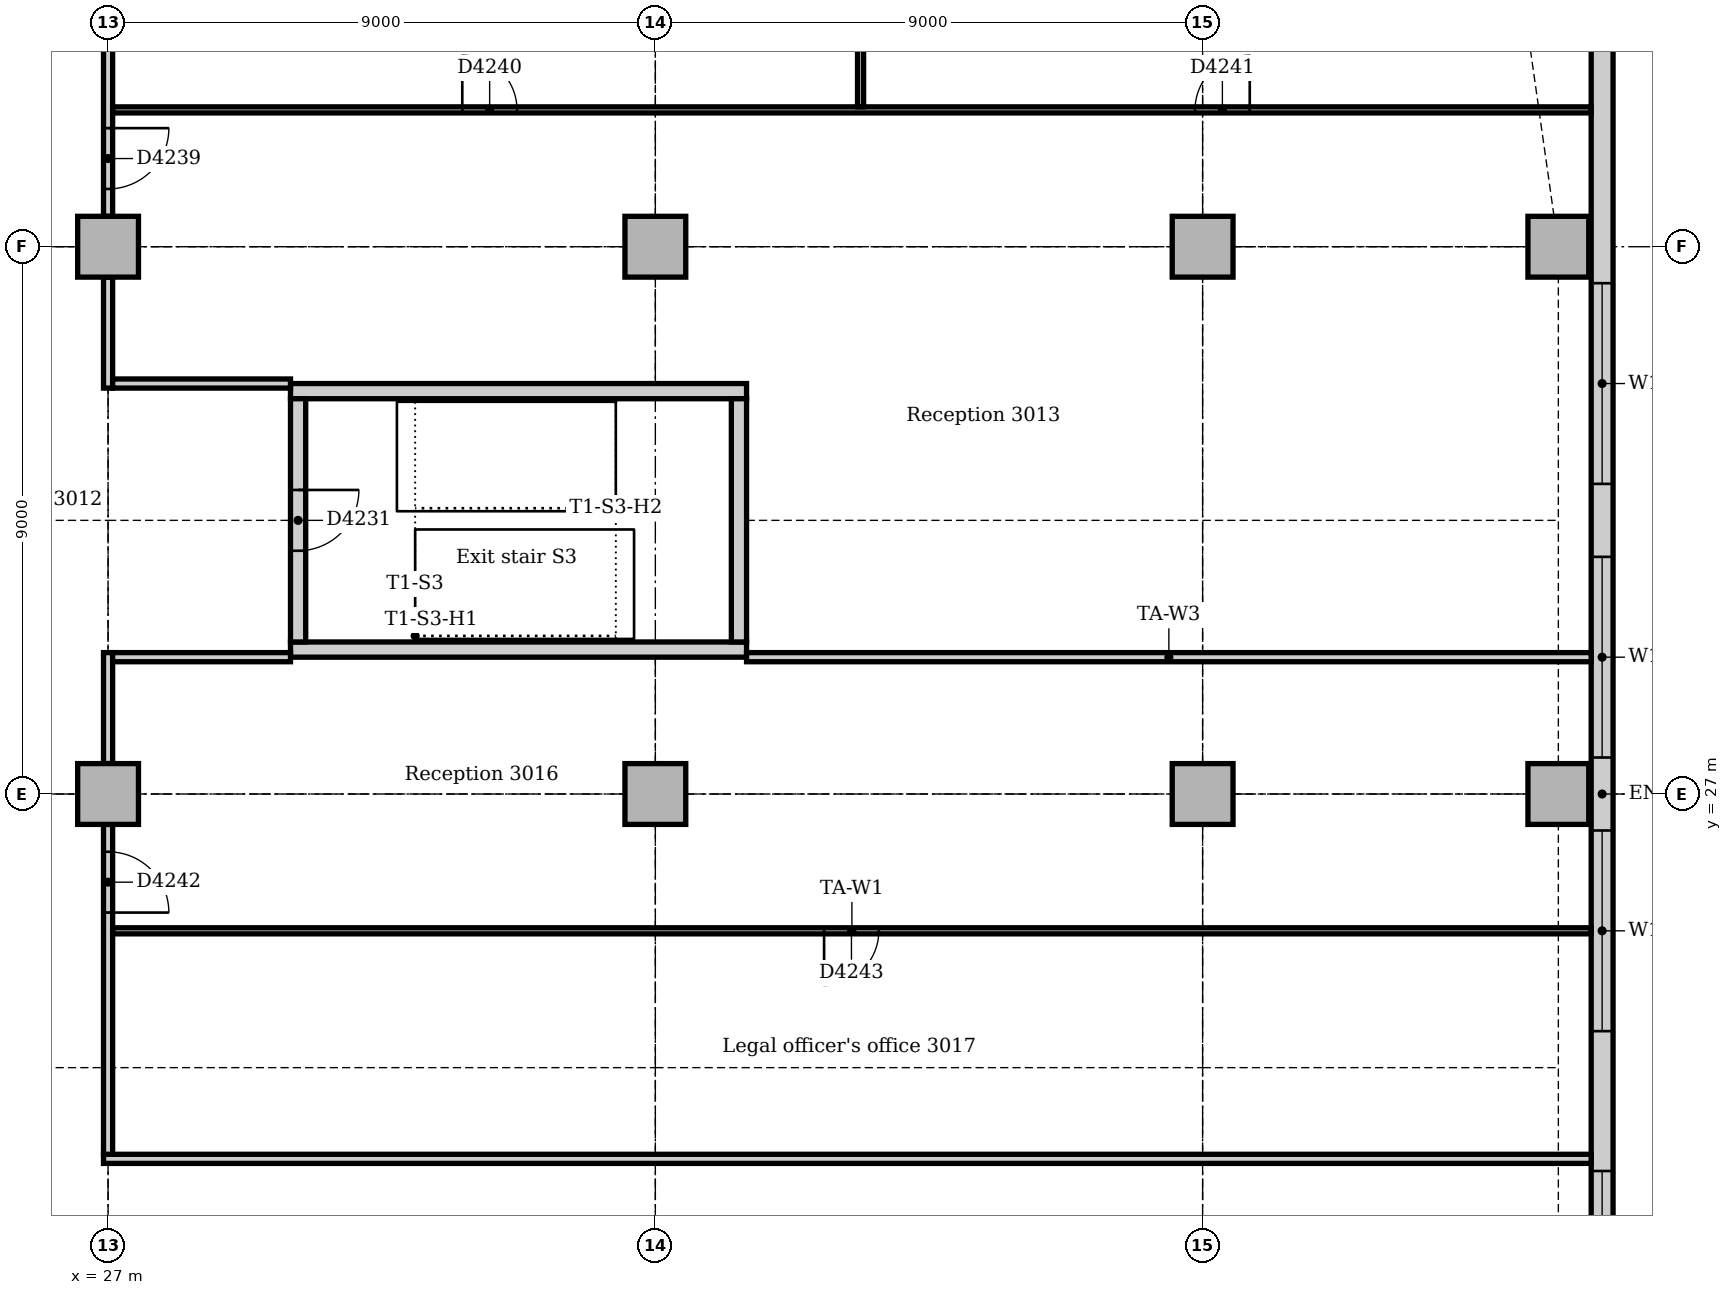
"""IFC4 building model, lengths in metres.
Left out: names, types, materials, properties, quantities, classifications, styles, units other than length and angle.
Written with IfcOpenShell. Run it as: python <this file> out.ifc"""

import sys

from ifc_helpers import new_model, si_unit, direction, frame, frame_2d, origin, origin_2d, place, context, subcontext, project, spatial, rectangle, extrude, element, fill, save


model = new_model("IFC4")
c1 = context("Model", 3, precision=1e-05, world=origin(), true_north=direction((0.0, 1.0)))
c2 = subcontext(c1, "Body", "Model", "MODEL_VIEW")
j1 = project(units=[si_unit("LENGTHUNIT", "METRE"), si_unit("PLANEANGLEUNIT", "RADIAN")], contexts=[c1])
p1 = place(None, origin())
s1 = spatial("IfcSite", under=j1, at=p1, CompositionType="ELEMENT")
p2 = place(p1, origin())
s2 = spatial("IfcBuilding", under=s1, at=p2, CompositionType="ELEMENT")
p3 = place(p2, frame((0.0, 0.0, 128.0)))
s3 = spatial("IfcBuildingStorey", under=s2, at=p3, CompositionType="ELEMENT", Elevation=128.0)
for number, where, z_axis, x_axis in (
    (1, (30.0, 29.375, 0.0), (0.0, 0.0, 1.0), (1.0, 0.0, 0.0)),
    (2, (37.5, 33.625, 0.0), (0.0, 0.0, 1.0), (-1.0, 0.0, 0.0)),
):
    element("IfcWall", number, at=place(p3, frame(where, z_axis=z_axis, x_axis=x_axis)), inside=s3, PredefinedType="SOLIDWALL", context=c2, shape_type="SweptSolid", body=[
        extrude(rectangle(XDim=7.5, YDim=0.25, at=frame_2d((3.75, 0.0))), origin(), (0.0, 0.0, 1.0), 4.0),
    ])
p4 = place(p3, frame((37.375, 29.5, 0.0), z_axis=(0.0, 0.0, 1.0), x_axis=(0.0, 1.0, 0.0)))
e3 = element("IfcWall", 3, at=p4, inside=s3, PredefinedType="SOLIDWALL", context=c2, shape_type="SweptSolid", body=[
    extrude(rectangle(XDim=4.0, YDim=0.25, at=frame_2d((2.0, 0.0))), origin(), (0.0, 0.0, 1.0), 4.0),
])
p5 = place(p3, frame((30.125, 33.5, 0.0), z_axis=(0.0, 0.0, 1.0), x_axis=(0.0, -1.0, 0.0)))
e4 = element("IfcWall", 4, at=p5, inside=s3, PredefinedType="SOLIDWALL", context=c2, shape_type="SweptSolid", body=[
    extrude(rectangle(XDim=4.0, YDim=0.25, at=frame_2d((2.0, 0.0))), origin(), (0.0, 0.0, 1.0), 4.0),
])
p6 = place(p5, frame((1.5, 0.0, 0.0)))
e5 = element("IfcOpeningElement", 5, at=p6, cuts=e4, PredefinedType="OPENING", context=c2, shape_type="SweptSolid", body=[
    extrude(rectangle(XDim=1.0, YDim=2.1, at=frame_2d((0.5, 1.05))), frame((0.0, 0.135, 0.0), z_axis=(0.0, -1.0, 0.0), x_axis=(1.0, 0.0, 0.0)), (0.0, 0.0, 1.0), 0.27),
])
for number, where, z_axis, x_axis in (
    (6, (50.85, 27.0, 0.0), (0.0, 0.0, 1.0), (1.0, 0.0, 0.0)),
    (7, (50.85, 36.0, 0.0), (0.0, 0.0, 1.0), (1.0, 0.0, 0.0)),
    (8, (27.0, 27.0, 0.0), (0.0, 0.0, 1.0), (1.0, 0.0, 0.0)),
    (9, (27.0, 36.0, 0.0), (0.0, 0.0, 1.0), (1.0, 0.0, 0.0)),
    (10, (36.0, 27.0, 0.0), (0.0, 0.0, 1.0), (1.0, 0.0, 0.0)),
    (11, (36.0, 36.0, 0.0), (0.0, 0.0, 1.0), (1.0, 0.0, 0.0)),
    (12, (45.0, 27.0, 0.0), (0.0, 0.0, 1.0), (1.0, 0.0, 0.0)),
    (13, (45.0, 36.0, 0.0), (0.0, 0.0, 1.0), (1.0, 0.0, 0.0)),
):
    element("IfcColumn", number, at=place(p3, frame(where, z_axis=z_axis, x_axis=x_axis)), inside=s3, PredefinedType="COLUMN", context=c2, shape_type="SweptSolid", body=[
        extrude(rectangle(XDim=1.0, YDim=1.0, at=origin_2d()), origin(), (0.0, 0.0, 1.0), 3.85),
    ])
p7 = place(p3, frame((51.57, 14.743, 0.0), z_axis=(0.0, 0.0, 1.0), x_axis=(0.0, 1.0, 0.0)))
e14 = element("IfcWall", 14, at=p7, inside=s3, PredefinedType="STANDARD", context=c2, shape_type="SweptSolid", body=[
    extrude(rectangle(XDim=24.515, YDim=0.36, at=frame_2d((12.257, 0.0))), origin(), (0.0, 0.0, 1.0), 3.85),
])
p8 = place(p7, frame((4.257, 0.0, 0.9)))
e15 = element("IfcOpeningElement", 15, at=p8, cuts=e14, PredefinedType="OPENING", context=c2, shape_type="SweptSolid", body=[
    extrude(rectangle(XDim=1.8, YDim=1.6, at=frame_2d((0.9, 0.8))), frame((0.0, 0.19, 0.0), z_axis=(0.0, -1.0, 0.0), x_axis=(1.0, 0.0, 0.0)), (0.0, 0.0, 1.0), 0.38),
])
p9 = place(p7, frame((8.357, 0.0, 0.9)))
e16 = element("IfcOpeningElement", 16, at=p9, cuts=e14, PredefinedType="OPENING", context=c2, shape_type="SweptSolid", body=[
    extrude(rectangle(XDim=3.3, YDim=1.6, at=frame_2d((1.65, 0.8))), frame((0.0, 0.19, 0.0), z_axis=(0.0, -1.0, 0.0), x_axis=(1.0, 0.0, 0.0)), (0.0, 0.0, 1.0), 0.38),
])
p10 = place(p7, frame((12.857, 0.0, 0.9)))
e17 = element("IfcOpeningElement", 17, at=p10, cuts=e14, PredefinedType="OPENING", context=c2, shape_type="SweptSolid", body=[
    extrude(rectangle(XDim=3.3, YDim=1.6, at=frame_2d((1.65, 0.8))), frame((0.0, 0.19, 0.0), z_axis=(0.0, -1.0, 0.0), x_axis=(1.0, 0.0, 0.0)), (0.0, 0.0, 1.0), 0.38),
])
p11 = place(p7, frame((17.357, 0.0, 0.9)))
e18 = element("IfcOpeningElement", 18, at=p11, cuts=e14, PredefinedType="OPENING", context=c2, shape_type="SweptSolid", body=[
    extrude(rectangle(XDim=3.3, YDim=1.6, at=frame_2d((1.65, 0.8))), frame((0.0, 0.19, 0.0), z_axis=(0.0, -1.0, 0.0), x_axis=(1.0, 0.0, 0.0)), (0.0, 0.0, 1.0), 0.38),
])
p12 = place(p3, frame((26.925, 21.0, 0.0), z_axis=(0.0, 0.0, 1.0), x_axis=(1.0, 0.0, 0.0)))
e19 = element("IfcWall", 19, at=p12, inside=s3, PredefinedType="PARTITIONING", context=c2, shape_type="SweptSolid", body=[
    extrude(rectangle(XDim=24.465, YDim=0.15, at=frame_2d((12.232, 0.0))), origin(), (0.0, 0.0, 1.0), 3.85),
])
p13 = place(p3, frame((27.0, 33.675, 0.0), z_axis=(0.0, 0.0, 1.0), x_axis=(0.0, 1.0, 0.0)))
e20 = element("IfcWall", 20, at=p13, inside=s3, PredefinedType="PARTITIONING", context=c2, shape_type="SweptSolid", body=[
    extrude(rectangle(XDim=1.825, YDim=0.15, at=frame_2d((0.912, 0.0))), origin(), (0.0, 0.0, 1.0), 3.256),
])
p14 = place(p3, frame((27.0, 36.5, 0.0), z_axis=(0.0, 0.0, 1.0), x_axis=(0.0, 1.0, 0.0)))
e21 = element("IfcWall", 21, at=p14, inside=s3, PredefinedType="PARTITIONING", context=c2, shape_type="SweptSolid", body=[
    extrude(rectangle(XDim=7.1, YDim=0.15, at=frame_2d((3.55, 0.0))), origin(), (0.0, 0.0, 1.0), 3.256),
])
p15 = place(p14, frame((0.45, 0.0, 0.0)))
e22 = element("IfcOpeningElement", 22, at=p15, cuts=e21, PredefinedType="OPENING", context=c2, shape_type="SweptSolid", body=[
    extrude(rectangle(XDim=1.0, YDim=2.1, at=frame_2d((0.5, 1.05))), frame((0.0, 0.085, 0.0), z_axis=(0.0, -1.0, 0.0), x_axis=(1.0, 0.0, 0.0)), (0.0, 0.0, 1.0), 0.17),
])
p16 = place(p3, frame((27.0, 21.075, 0.0), z_axis=(0.0, 0.0, 1.0), x_axis=(0.0, 1.0, 0.0)))
e23 = element("IfcWall", 23, at=p16, inside=s3, PredefinedType="PARTITIONING", context=c2, shape_type="SweptSolid", body=[
    extrude(rectangle(XDim=5.425, YDim=0.15, at=frame_2d((2.712, 0.0))), origin(), (0.0, 0.0, 1.0), 3.256),
])
p17 = place(p16, frame((3.975, 0.0, 0.0)))
e24 = element("IfcOpeningElement", 24, at=p17, cuts=e23, PredefinedType="OPENING", context=c2, shape_type="SweptSolid", body=[
    extrude(rectangle(XDim=1.0, YDim=2.1, at=frame_2d((0.5, 1.05))), frame((0.0, 0.085, 0.0), z_axis=(0.0, -1.0, 0.0), x_axis=(1.0, 0.0, 0.0)), (0.0, 0.0, 1.0), 0.17),
])
p18 = place(p3, frame((27.0, 27.5, 0.0), z_axis=(0.0, 0.0, 1.0), x_axis=(0.0, 1.0, 0.0)))
e25 = element("IfcWall", 25, at=p18, inside=s3, PredefinedType="PARTITIONING", context=c2, shape_type="SweptSolid", body=[
    extrude(rectangle(XDim=1.825, YDim=0.15, at=frame_2d((0.912, 0.0))), origin(), (0.0, 0.0, 1.0), 3.256),
])
for number, where, z_axis, x_axis in (
    (26, (27.075, 29.25, 0.0), (0.0, 0.0, 1.0), (1.0, 0.0, 0.0)),
    (27, (27.075, 33.75, 0.0), (0.0, 0.0, 1.0), (1.0, 0.0, 0.0)),
):
    element("IfcWall", number, at=place(p3, frame(where, z_axis=z_axis, x_axis=x_axis)), inside=s3, PredefinedType="PARTITIONING", context=c2, shape_type="SweptSolid", body=[
        extrude(rectangle(XDim=2.925, YDim=0.15, at=frame_2d((1.462, 0.0))), origin(), (0.0, 0.0, 1.0), 3.85),
    ])
p19 = place(p3, frame((37.5, 29.25, 0.0), z_axis=(0.0, 0.0, 1.0), x_axis=(1.0, 0.0, 0.0)))
e28 = element("IfcWall", 28, at=p19, inside=s3, PredefinedType="PARTITIONING", context=c2, shape_type="SweptSolid", body=[
    extrude(rectangle(XDim=13.89, YDim=0.15, at=frame_2d((6.945, 0.0))), origin(), (0.0, 0.0, 1.0), 3.85),
])
p20 = place(p3, frame((27.075, 24.75, 0.0), z_axis=(0.0, 0.0, 1.0), x_axis=(1.0, 0.0, 0.0)))
e29 = element("IfcWall", 29, at=p20, inside=s3, PredefinedType="PARTITIONING", context=c2, shape_type="SweptSolid", body=[
    extrude(rectangle(XDim=24.315, YDim=0.1, at=frame_2d((12.158, 0.0))), origin(), (0.0, 0.0, 1.0), 3.85),
])
p21 = place(p20, frame((11.7, 0.0, 0.0)))
e30 = element("IfcOpeningElement", 30, at=p21, cuts=e29, PredefinedType="OPENING", context=c2, shape_type="SweptSolid", body=[
    extrude(rectangle(XDim=0.9, YDim=2.1, at=frame_2d((0.45, 1.05))), frame((0.0, 0.06, 0.0), z_axis=(0.0, -1.0, 0.0), x_axis=(1.0, 0.0, 0.0)), (0.0, 0.0, 1.0), 0.12),
])
p22 = place(p3, frame((27.075, 38.25, 0.0), z_axis=(0.0, 0.0, 1.0), x_axis=(1.0, 0.0, 0.0)))
e31 = element("IfcWall", 31, at=p22, inside=s3, PredefinedType="PARTITIONING", context=c2, shape_type="SweptSolid", body=[
    extrude(rectangle(XDim=24.315, YDim=0.1, at=frame_2d((12.158, 0.0))), origin(), (0.0, 0.0, 1.0), 3.85),
])
p23 = place(p22, frame((5.75, 0.0, 0.0)))
e32 = element("IfcOpeningElement", 32, at=p23, cuts=e31, PredefinedType="OPENING", context=c2, shape_type="SweptSolid", body=[
    extrude(rectangle(XDim=0.9, YDim=2.1, at=frame_2d((0.45, 1.05))), frame((0.0, 0.06, 0.0), z_axis=(0.0, -1.0, 0.0), x_axis=(1.0, 0.0, 0.0)), (0.0, 0.0, 1.0), 0.12),
])
p24 = place(p22, frame((17.8, 0.0, 0.0)))
e33 = element("IfcOpeningElement", 33, at=p24, cuts=e31, PredefinedType="OPENING", context=c2, shape_type="SweptSolid", body=[
    extrude(rectangle(XDim=0.9, YDim=2.1, at=frame_2d((0.45, 1.05))), frame((0.0, 0.06, 0.0), z_axis=(0.0, -1.0, 0.0), x_axis=(1.0, 0.0, 0.0)), (0.0, 0.0, 1.0), 0.12),
])
p25 = place(p3, frame((39.375, 38.3, 0.0), z_axis=(0.0, 0.0, 1.0), x_axis=(0.0, 1.0, 0.0)))
e34 = element("IfcWall", 34, at=p25, inside=s3, PredefinedType="PARTITIONING", context=c2, shape_type="SweptSolid", body=[
    extrude(rectangle(XDim=10.84, YDim=0.1, at=frame_2d((5.42, 0.0))), origin(), (0.0, 0.0, 1.0), 3.85),
])
p26 = place(p8, origin())
e35 = element("IfcWindow", 35, at=p26, inside=s3, PartitioningType="SINGLE_PANEL", PredefinedType="WINDOW", context=c2, shape_type="SweptSolid", body=[
    extrude(rectangle(XDim=1.8, YDim=1.6, at=frame_2d((0.9, 0.8))), frame((0.0, 0.13, 0.0), z_axis=(0.0, -1.0, 0.0), x_axis=(1.0, 0.0, 0.0)), (0.0, 0.0, 1.0), 0.06),
])
fill(e15, e35)
p27 = place(p9, origin())
e36 = element("IfcWindow", 36, at=p27, inside=s3, PartitioningType="SINGLE_PANEL", PredefinedType="WINDOW", context=c2, shape_type="SweptSolid", body=[
    extrude(rectangle(XDim=3.3, YDim=1.6, at=frame_2d((1.65, 0.8))), frame((0.0, 0.13, 0.0), z_axis=(0.0, -1.0, 0.0), x_axis=(1.0, 0.0, 0.0)), (0.0, 0.0, 1.0), 0.06),
])
fill(e16, e36)
p28 = place(p10, origin())
e37 = element("IfcWindow", 37, at=p28, inside=s3, PartitioningType="SINGLE_PANEL", PredefinedType="WINDOW", context=c2, shape_type="SweptSolid", body=[
    extrude(rectangle(XDim=3.3, YDim=1.6, at=frame_2d((1.65, 0.8))), frame((0.0, 0.13, 0.0), z_axis=(0.0, -1.0, 0.0), x_axis=(1.0, 0.0, 0.0)), (0.0, 0.0, 1.0), 0.06),
])
fill(e17, e37)
p29 = place(p11, origin())
e38 = element("IfcWindow", 38, at=p29, inside=s3, PartitioningType="SINGLE_PANEL", PredefinedType="WINDOW", context=c2, shape_type="SweptSolid", body=[
    extrude(rectangle(XDim=3.3, YDim=1.6, at=frame_2d((1.65, 0.8))), frame((0.0, 0.13, 0.0), z_axis=(0.0, -1.0, 0.0), x_axis=(1.0, 0.0, 0.0)), (0.0, 0.0, 1.0), 0.06),
])
fill(e18, e38)
p30 = place(p6, origin())
e39 = element("IfcDoor", 39, at=p30, inside=s3, OperationType="SINGLE_SWING_LEFT", PredefinedType="DOOR", context=c2, shape_type="SweptSolid", body=[
    extrude(rectangle(XDim=1.0, YDim=2.1, at=frame_2d((0.5, 1.05))), frame((0.0, 0.025, 0.0), z_axis=(0.0, -1.0, 0.0), x_axis=(1.0, 0.0, 0.0)), (0.0, 0.0, 1.0), 0.05),
])
fill(e5, e39)
p31 = place(p15, frame((1.0, 0.0, 0.0), z_axis=(0.0, 0.0, 1.0), x_axis=(-1.0, 0.0, 0.0)))
e40 = element("IfcDoor", 40, at=p31, inside=s3, OperationType="SINGLE_SWING_LEFT", PredefinedType="DOOR", context=c2, shape_type="SweptSolid", body=[
    extrude(rectangle(XDim=1.0, YDim=2.1, at=frame_2d((0.5, 1.05))), frame((0.0, 0.025, 0.0), z_axis=(0.0, -1.0, 0.0), x_axis=(1.0, 0.0, 0.0)), (0.0, 0.0, 1.0), 0.05),
])
fill(e22, e40)
p32 = place(p23, origin())
e41 = element("IfcDoor", 41, at=p32, inside=s3, OperationType="SINGLE_SWING_LEFT", PredefinedType="DOOR", context=c2, shape_type="SweptSolid", body=[
    extrude(rectangle(XDim=0.9, YDim=2.1, at=frame_2d((0.45, 1.05))), frame((0.0, 0.025, 0.0), z_axis=(0.0, -1.0, 0.0), x_axis=(1.0, 0.0, 0.0)), (0.0, 0.0, 1.0), 0.05),
])
fill(e32, e41)
p33 = place(p24, origin())
e42 = element("IfcDoor", 42, at=p33, inside=s3, OperationType="SINGLE_SWING_RIGHT", PredefinedType="DOOR", context=c2, shape_type="SweptSolid", body=[
    extrude(rectangle(XDim=0.9, YDim=2.1, at=frame_2d((0.45, 1.05))), frame((0.0, 0.025, 0.0), z_axis=(0.0, -1.0, 0.0), x_axis=(1.0, 0.0, 0.0)), (0.0, 0.0, 1.0), 0.05),
])
fill(e33, e42)
p34 = place(p17, frame((1.0, 0.0, 0.0), z_axis=(0.0, 0.0, 1.0), x_axis=(-1.0, 0.0, 0.0)))
e43 = element("IfcDoor", 43, at=p34, inside=s3, OperationType="SINGLE_SWING_RIGHT", PredefinedType="DOOR", context=c2, shape_type="SweptSolid", body=[
    extrude(rectangle(XDim=1.0, YDim=2.1, at=frame_2d((0.5, 1.05))), frame((0.0, 0.025, 0.0), z_axis=(0.0, -1.0, 0.0), x_axis=(1.0, 0.0, 0.0)), (0.0, 0.0, 1.0), 0.05),
])
fill(e24, e43)
p35 = place(p21, frame((0.9, 0.0, 0.0), z_axis=(0.0, 0.0, 1.0), x_axis=(-1.0, 0.0, 0.0)))
e44 = element("IfcDoor", 44, at=p35, inside=s3, OperationType="SINGLE_SWING_RIGHT", PredefinedType="DOOR", context=c2, shape_type="SweptSolid", body=[
    extrude(rectangle(XDim=0.9, YDim=2.1, at=frame_2d((0.45, 1.05))), frame((0.0, 0.025, 0.0), z_axis=(0.0, -1.0, 0.0), x_axis=(1.0, 0.0, 0.0)), (0.0, 0.0, 1.0), 0.05),
])
fill(e30, e44)
save(model, sys.argv[1])
